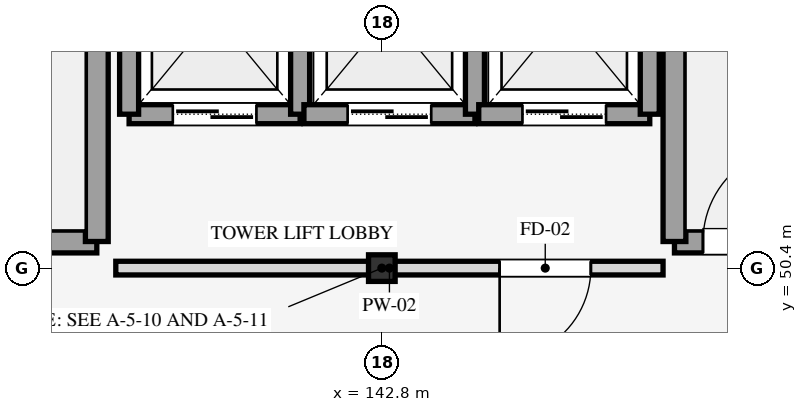
"""IFC4 building model, lengths in metres.
Left out: names, types, materials, properties, quantities, classifications, styles, units other than length and angle.
Written with IfcOpenShell. Run it as: python <this file> out.ifc"""

import sys

from ifc_helpers import new_model, si_unit, direction, frame, frame_2d, origin, origin_2d, place, context, subcontext, project, spatial, rectangle, i_section, extrude, element, fill, save


model = new_model("IFC4")
c1 = context("Model", 3, precision=1e-05, world=origin(), true_north=direction((0.0, 1.0)))
c2 = subcontext(c1, "Body", "Model", "MODEL_VIEW")
j1 = project(units=[si_unit("LENGTHUNIT", "METRE"), si_unit("PLANEANGLEUNIT", "RADIAN")], contexts=[c1])
p1 = place(None, origin())
s1 = spatial("IfcSite", under=j1, at=p1, CompositionType="ELEMENT")
p2 = place(p1, origin())
s2 = spatial("IfcBuilding", under=s1, at=p2, CompositionType="ELEMENT")
p3 = place(p2, frame((0.0, 0.0, 53.1)))
s3 = spatial("IfcBuildingStorey", under=s2, at=p3, CompositionType="ELEMENT", Elevation=53.1)
p4 = place(p3, frame((142.8, 50.4, 0.0), z_axis=(0.0, 0.0, 1.0), x_axis=(1.0, 0.0, 0.0)))
e1 = element("IfcColumn", 1, at=p4, inside=s3, PredefinedType="COLUMN", context=c2, shape_type="SweptSolid", body=[
    extrude(i_section(OverallWidth=0.35, OverallDepth=0.35, WebThickness=0.012, FlangeThickness=0.019, FilletRadius=0.02, at=origin_2d()), origin(), (0.0, 0.0, 1.0), 4.2),
])
p5 = place(p3, frame((135.05, 50.75, 0.0), z_axis=(0.0, 0.0, 1.0), x_axis=(1.0, 0.0, 0.0)))
e2 = element("IfcWall", 2, at=p5, inside=s3, PredefinedType="SHEAR", context=c2, shape_type="SweptSolid", body=[
    extrude(rectangle(XDim=4.0, YDim=0.3, at=frame_2d((2.0, 0.0))), origin(), (0.0, 0.0, 1.0), 4.2),
])
p6 = place(p5, frame((0.375, 0.0, 0.0)))
e3 = element("IfcOpeningElement", 3, at=p6, cuts=e2, PredefinedType="OPENING", context=c2, shape_type="SweptSolid", body=[
    extrude(rectangle(XDim=1.25, YDim=2.15, at=frame_2d((0.625, 1.075))), frame((0.0, 0.16, 0.0), z_axis=(0.0, -1.0, 0.0), x_axis=(1.0, 0.0, 0.0)), (0.0, 0.0, 1.0), 0.32),
])
p7 = place(p3, frame((139.05, 50.75, 0.0), z_axis=(0.0, 0.0, 1.0), x_axis=(0.0, 1.0, 0.0)))
e4 = element("IfcWall", 4, at=p7, inside=s3, PredefinedType="SHEAR", context=c2, shape_type="SweptSolid", body=[
    extrude(rectangle(XDim=14.3, YDim=0.3, at=frame_2d((7.15, 0.0))), origin(), (0.0, 0.0, 1.0), 4.2),
])
p8 = place(p3, frame((146.65, 50.75, 0.0), z_axis=(0.0, 0.0, 1.0), x_axis=(1.0, 0.0, 0.0)))
e5 = element("IfcWall", 5, at=p8, inside=s3, PredefinedType="SHEAR", context=c2, shape_type="SweptSolid", body=[
    extrude(rectangle(XDim=4.0, YDim=0.3, at=frame_2d((2.0, 0.0))), origin(), (0.0, 0.0, 1.0), 4.2),
])
p9 = place(p8, frame((0.375, 0.0, 0.0)))
e6 = element("IfcOpeningElement", 6, at=p9, cuts=e5, PredefinedType="OPENING", context=c2, shape_type="SweptSolid", body=[
    extrude(rectangle(XDim=1.25, YDim=2.15, at=frame_2d((0.625, 1.075))), frame((0.0, 0.16, 0.0), z_axis=(0.0, -1.0, 0.0), x_axis=(1.0, 0.0, 0.0)), (0.0, 0.0, 1.0), 0.32),
])
p10 = place(p3, frame((146.65, 50.75, 0.0), z_axis=(0.0, 0.0, 1.0), x_axis=(0.0, 1.0, 0.0)))
e7 = element("IfcWall", 7, at=p10, inside=s3, PredefinedType="SHEAR", context=c2, shape_type="SweptSolid", body=[
    extrude(rectangle(XDim=14.3, YDim=0.3, at=frame_2d((7.15, 0.0))), origin(), (0.0, 0.0, 1.0), 4.2),
])
p11 = place(p3, frame((139.475, 52.425, 0.0), z_axis=(0.0, 0.0, 1.0), x_axis=(1.0, 0.0, 0.0)))
e8 = element("IfcWall", 8, at=p11, inside=s3, PredefinedType="SHEAR", context=c2, shape_type="SweptSolid", body=[
    extrude(rectangle(XDim=2.25, YDim=0.25, at=frame_2d((1.125, 0.0))), origin(), (0.0, 0.0, 1.0), 3.96),
])
p12 = place(p11, frame((0.575, 0.0, 0.0)))
e9 = element("IfcOpeningElement", 9, at=p12, cuts=e8, PredefinedType="OPENING", context=c2, shape_type="SweptSolid", body=[
    extrude(rectangle(XDim=1.1, YDim=2.15, at=frame_2d((0.55, 1.075))), frame((0.0, 0.135, 0.0), z_axis=(0.0, -1.0, 0.0), x_axis=(1.0, 0.0, 0.0)), (0.0, 0.0, 1.0), 0.27),
])
for number, where, z_axis, x_axis in (
    (10, (139.475, 52.425, 0.0), (0.0, 0.0, 1.0), (0.0, 1.0, 0.0)),
    (11, (141.725, 52.425, 0.0), (0.0, 0.0, 1.0), (0.0, 1.0, 0.0)),
):
    element("IfcWall", number, at=place(p3, frame(where, z_axis=z_axis, x_axis=x_axis)), inside=s3, PredefinedType="SHEAR", context=c2, shape_type="SweptSolid", body=[
        extrude(rectangle(XDim=2.65, YDim=0.25, at=frame_2d((1.325, 0.0))), origin(), (0.0, 0.0, 1.0), 3.96),
    ])
p13 = place(p3, frame((141.775, 52.425, 0.0), z_axis=(0.0, 0.0, 1.0), x_axis=(1.0, 0.0, 0.0)))
e12 = element("IfcWall", 12, at=p13, inside=s3, PredefinedType="SHEAR", context=c2, shape_type="SweptSolid", body=[
    extrude(rectangle(XDim=2.25, YDim=0.25, at=frame_2d((1.125, 0.0))), origin(), (0.0, 0.0, 1.0), 3.96),
])
p14 = place(p13, frame((0.575, 0.0, 0.0)))
e13 = element("IfcOpeningElement", 13, at=p14, cuts=e12, PredefinedType="OPENING", context=c2, shape_type="SweptSolid", body=[
    extrude(rectangle(XDim=1.1, YDim=2.15, at=frame_2d((0.55, 1.075))), frame((0.0, 0.135, 0.0), z_axis=(0.0, -1.0, 0.0), x_axis=(1.0, 0.0, 0.0)), (0.0, 0.0, 1.0), 0.27),
])
p15 = place(p3, frame((144.025, 52.425, 0.0), z_axis=(0.0, 0.0, 1.0), x_axis=(0.0, 1.0, 0.0)))
e14 = element("IfcWall", 14, at=p15, inside=s3, PredefinedType="SHEAR", context=c2, shape_type="SweptSolid", body=[
    extrude(rectangle(XDim=2.65, YDim=0.25, at=frame_2d((1.325, 0.0))), origin(), (0.0, 0.0, 1.0), 3.96),
])
p16 = place(p3, frame((144.075, 52.425, 0.0), z_axis=(0.0, 0.0, 1.0), x_axis=(1.0, 0.0, 0.0)))
e15 = element("IfcWall", 15, at=p16, inside=s3, PredefinedType="SHEAR", context=c2, shape_type="SweptSolid", body=[
    extrude(rectangle(XDim=2.25, YDim=0.25, at=frame_2d((1.125, 0.0))), origin(), (0.0, 0.0, 1.0), 3.96),
])
p17 = place(p16, frame((0.575, 0.0, 0.0)))
e16 = element("IfcOpeningElement", 16, at=p17, cuts=e15, PredefinedType="OPENING", context=c2, shape_type="SweptSolid", body=[
    extrude(rectangle(XDim=1.1, YDim=2.15, at=frame_2d((0.55, 1.075))), frame((0.0, 0.135, 0.0), z_axis=(0.0, -1.0, 0.0), x_axis=(1.0, 0.0, 0.0)), (0.0, 0.0, 1.0), 0.27),
])
p18 = place(p3, frame((146.325, 52.425, 0.0), z_axis=(0.0, 0.0, 1.0), x_axis=(0.0, 1.0, 0.0)))
e17 = element("IfcWall", 17, at=p18, inside=s3, PredefinedType="SHEAR", context=c2, shape_type="SweptSolid", body=[
    extrude(rectangle(XDim=2.65, YDim=0.25, at=frame_2d((1.325, 0.0))), origin(), (0.0, 0.0, 1.0), 3.96),
])
p19 = place(p3, frame((139.3, 50.4, 0.0), z_axis=(0.0, 0.0, 1.0), x_axis=(1.0, 0.0, 0.0)))
e18 = element("IfcWall", 18, at=p19, inside=s3, PredefinedType="PARTITIONING", context=c2, shape_type="SweptSolid", body=[
    extrude(rectangle(XDim=7.2, YDim=0.18, at=frame_2d((3.6, 0.0))), origin(), (0.0, 0.0, 1.0), 3.24),
])
p20 = place(p19, frame((5.05, 0.0, 0.0)))
e19 = element("IfcOpeningElement", 19, at=p20, cuts=e18, PredefinedType="OPENING", context=c2, shape_type="SweptSolid", body=[
    extrude(rectangle(XDim=1.2, YDim=2.15, at=frame_2d((0.6, 1.075))), frame((0.0, 0.1, 0.0), z_axis=(0.0, -1.0, 0.0), x_axis=(1.0, 0.0, 0.0)), (0.0, 0.0, 1.0), 0.2),
])
p21 = place(p9, origin())
e20 = element("IfcDoor", 20, at=p21, inside=s3, OperationType="SINGLE_SWING_RIGHT", PredefinedType="DOOR", context=c2, shape_type="SweptSolid", body=[
    extrude(rectangle(XDim=1.25, YDim=2.15, at=frame_2d((0.625, 1.075))), frame((0.0, 0.025, 0.0), z_axis=(0.0, -1.0, 0.0), x_axis=(1.0, 0.0, 0.0)), (0.0, 0.0, 1.0), 0.05),
])
fill(e6, e20)
p22 = place(p12, origin())
e21 = element("IfcDoor", 21, at=p22, inside=s3, OperationType="DOUBLE_DOOR_SLIDING", PredefinedType="DOOR", context=c2, shape_type="SweptSolid", body=[
    extrude(rectangle(XDim=1.1, YDim=2.15, at=frame_2d((0.55, 1.075))), frame((0.0, 0.025, 0.0), z_axis=(0.0, -1.0, 0.0), x_axis=(1.0, 0.0, 0.0)), (0.0, 0.0, 1.0), 0.05),
])
fill(e9, e21)
p23 = place(p14, origin())
e22 = element("IfcDoor", 22, at=p23, inside=s3, OperationType="DOUBLE_DOOR_SLIDING", PredefinedType="DOOR", context=c2, shape_type="SweptSolid", body=[
    extrude(rectangle(XDim=1.1, YDim=2.15, at=frame_2d((0.55, 1.075))), frame((0.0, 0.025, 0.0), z_axis=(0.0, -1.0, 0.0), x_axis=(1.0, 0.0, 0.0)), (0.0, 0.0, 1.0), 0.05),
])
fill(e13, e22)
p24 = place(p17, origin())
e23 = element("IfcDoor", 23, at=p24, inside=s3, OperationType="DOUBLE_DOOR_SLIDING", PredefinedType="DOOR", context=c2, shape_type="SweptSolid", body=[
    extrude(rectangle(XDim=1.1, YDim=2.15, at=frame_2d((0.55, 1.075))), frame((0.0, 0.025, 0.0), z_axis=(0.0, -1.0, 0.0), x_axis=(1.0, 0.0, 0.0)), (0.0, 0.0, 1.0), 0.05),
])
fill(e16, e23)
p25 = place(p20, frame((1.2, 0.0, 0.0), z_axis=(0.0, 0.0, 1.0), x_axis=(-1.0, 0.0, 0.0)))
e24 = element("IfcDoor", 24, at=p25, inside=s3, OperationType="SINGLE_SWING_RIGHT", PredefinedType="DOOR", context=c2, shape_type="SweptSolid", body=[
    extrude(rectangle(XDim=1.2, YDim=2.15, at=frame_2d((0.6, 1.075))), frame((0.0, 0.025, 0.0), z_axis=(0.0, -1.0, 0.0), x_axis=(1.0, 0.0, 0.0)), (0.0, 0.0, 1.0), 0.05),
])
fill(e19, e24)
save(model, sys.argv[1])
